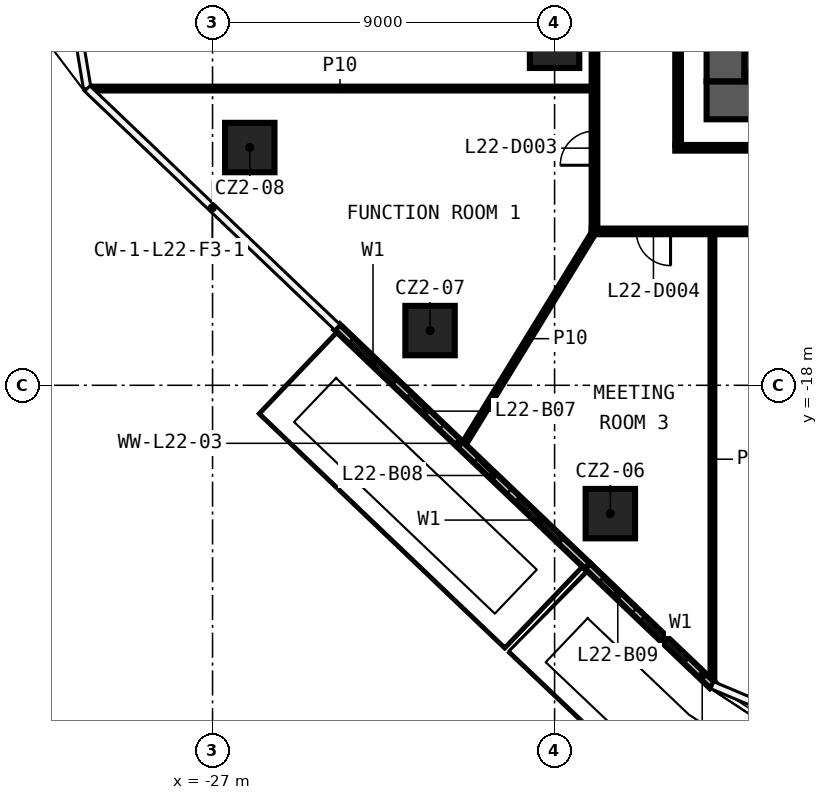
"""IFC4 building model, lengths in metres.
Left out: names, types, materials, properties, quantities, classifications, styles, units other than length and angle.
Written with IfcOpenShell. Run it as: python <this file> out.ifc"""

import sys

from ifc_helpers import new_model, si_unit, direction, frame, frame_2d, origin, origin_2d, place, context, subcontext, project, spatial, rectangle, extrude, element, fill, save


model = new_model("IFC4")
c1 = context("Model", 3, precision=1e-05, world=origin(), true_north=direction((0.0, 1.0)))
c2 = subcontext(c1, "Body", "Model", "MODEL_VIEW")
j1 = project(units=[si_unit("LENGTHUNIT", "METRE"), si_unit("PLANEANGLEUNIT", "RADIAN")], contexts=[c1])
p1 = place(None, origin())
s1 = spatial("IfcSite", under=j1, at=p1, CompositionType="ELEMENT")
p2 = place(p1, origin())
s2 = spatial("IfcBuilding", under=s1, at=p2, CompositionType="ELEMENT")
p3 = place(p2, frame((0.0, 0.0, 106.3)))
s3 = spatial("IfcBuildingStorey", under=s2, at=p3, CompositionType="ELEMENT", Elevation=106.3)
for number, where, z_axis, x_axis in (
    (1, (-16.533, -21.377, 0.0), (0.0, 0.0, 1.0), (1.0, 0.0, 0.0)),
    (2, (-21.277, -16.56, 0.0), (0.0, 0.0, 1.0), (1.0, 0.0, 0.0)),
    (3, (-26.021, -11.743, 0.0), (0.0, 0.0, 1.0), (1.0, 0.0, 0.0)),
    (4, (-18.0, -9.0, 0.0), (0.0, 0.0, 1.0), (1.0, 0.0, 0.0)),
):
    element("IfcColumn", number, at=place(p3, frame(where, z_axis=z_axis, x_axis=x_axis)), inside=s3, PredefinedType="COLUMN", context=c2, shape_type="SweptSolid", body=[
        extrude(rectangle(XDim=1.3, YDim=1.3, at=origin_2d()), origin(), (0.0, 0.0, 1.0), 3.3),
    ])
p4 = place(p3, frame((17.025, -13.95, 0.0), z_axis=(0.0, 0.0, 1.0), x_axis=(-1.0, 0.0, 0.0)))
e5 = element("IfcWall", 5, at=p4, inside=s3, PredefinedType="PARTITIONING", context=c2, shape_type="SweptSolid", body=[
    extrude(rectangle(XDim=34.05, YDim=0.15, at=frame_2d((17.025, 0.0))), origin(), (0.0, 0.0, 1.0), 3.3),
])
p5 = place(p4, frame((31.974, 0.0, 0.0)))
e6 = element("IfcOpeningElement", 6, at=p5, cuts=e5, PredefinedType="OPENING", context=c2, shape_type="SweptSolid", body=[
    extrude(rectangle(XDim=0.9, YDim=2.1, at=frame_2d((0.45, 1.05))), frame((0.0, 0.085, 0.0), z_axis=(0.0, -1.0, 0.0), x_axis=(1.0, 0.0, 0.0)), (0.0, 0.0, 1.0), 0.17),
])
p6 = place(p4, frame((27.543, 0.0, 0.0)))
e7 = element("IfcOpeningElement", 7, at=p6, cuts=e5, PredefinedType="OPENING", context=c2, shape_type="SweptSolid", body=[
    extrude(rectangle(XDim=1.0, YDim=2.1, at=frame_2d((0.5, 1.05))), frame((0.0, 0.085, 0.0), z_axis=(0.0, -1.0, 0.0), x_axis=(1.0, 0.0, 0.0)), (0.0, 0.0, 1.0), 0.17),
])
p7 = place(p4, frame((16.333, 0.0, 0.0)))
e8 = element("IfcOpeningElement", 8, at=p7, cuts=e5, PredefinedType="OPENING", context=c2, shape_type="SweptSolid", body=[
    extrude(rectangle(XDim=1.0, YDim=2.1, at=frame_2d((0.5, 1.05))), frame((0.0, 0.085, 0.0), z_axis=(0.0, -1.0, 0.0), x_axis=(1.0, 0.0, 0.0)), (0.0, 0.0, 1.0), 0.17),
])
p8 = place(p4, frame((12.006, 0.0, 0.0)))
e9 = element("IfcOpeningElement", 9, at=p8, cuts=e5, PredefinedType="OPENING", context=c2, shape_type="SweptSolid", body=[
    extrude(rectangle(XDim=1.0, YDim=2.1, at=frame_2d((0.5, 1.05))), frame((0.0, 0.085, 0.0), z_axis=(0.0, -1.0, 0.0), x_axis=(1.0, 0.0, 0.0)), (0.0, 0.0, 1.0), 0.17),
])
p9 = place(p4, frame((5.124, 0.0, 0.0)))
e10 = element("IfcOpeningElement", 10, at=p9, cuts=e5, PredefinedType="OPENING", context=c2, shape_type="SweptSolid", body=[
    extrude(rectangle(XDim=1.0, YDim=2.1, at=frame_2d((0.5, 1.05))), frame((0.0, 0.085, 0.0), z_axis=(0.0, -1.0, 0.0), x_axis=(1.0, 0.0, 0.0)), (0.0, 0.0, 1.0), 0.17),
])
p10 = place(p4, frame((3.144, 0.0, 0.0)))
e11 = element("IfcOpeningElement", 11, at=p10, cuts=e5, PredefinedType="OPENING", context=c2, shape_type="SweptSolid", body=[
    extrude(rectangle(XDim=1.0, YDim=2.1, at=frame_2d((0.5, 1.05))), frame((0.0, 0.085, 0.0), z_axis=(0.0, -1.0, 0.0), x_axis=(1.0, 0.0, 0.0)), (0.0, 0.0, 1.0), 0.17),
])
p11 = place(p3, frame((-14.825, -11.75, 0.0), z_axis=(0.0, 0.0, 1.0), x_axis=(1.0, 0.0, 0.0)))
e12 = element("IfcWall", 12, at=p11, inside=s3, PredefinedType="PARTITIONING", context=c2, shape_type="SweptSolid", body=[
    extrude(rectangle(XDim=22.025, YDim=0.15, at=frame_2d((11.012, 0.0))), origin(), (0.0, 0.0, 1.0), 3.3),
])
p12 = place(p3, frame((-30.268, -10.191, 0.0), z_axis=(0.0, 0.0, 1.0), x_axis=(1.0, 0.0, 0.0)))
e13 = element("IfcWall", 13, at=p12, inside=s3, PredefinedType="PARTITIONING", context=c2, shape_type="SweptSolid", body=[
    extrude(rectangle(XDim=13.243, YDim=0.1, at=frame_2d((6.622, 0.0))), origin(), (0.0, 0.0, 1.0), 3.3),
])
p13 = place(p3, frame((-20.415, -19.596, 0.0), z_axis=(0.0, 0.0, 1.0), x_axis=(0.5230874117, 0.85227903865, 0.0)))
e14 = element("IfcWall", 14, at=p13, inside=s3, PredefinedType="PARTITIONING", context=c2, shape_type="SweptSolid", body=[
    extrude(rectangle(XDim=6.624, YDim=0.1, at=frame_2d((3.312, 0.0))), origin(), (0.0, 0.0, 1.0), 3.3),
])
p14 = place(p3, frame((-13.847, -25.865, 0.0), z_axis=(0.0, 0.0, 1.0), x_axis=(0.0, 1.0, 0.0)))
e15 = element("IfcWall", 15, at=p14, inside=s3, PredefinedType="PARTITIONING", context=c2, shape_type="SweptSolid", body=[
    extrude(rectangle(XDim=11.84, YDim=0.1, at=frame_2d((5.92, 0.0))), origin(), (0.0, 0.0, 1.0), 3.3),
])
p15 = place(p3, frame((-14.75, 11.675, 0.0), z_axis=(0.0, 0.0, 1.0), x_axis=(0.0, -1.0, 0.0)))
e16 = element("IfcWall", 16, at=p15, inside=s3, PredefinedType="PARTITIONING", context=c2, shape_type="SweptSolid", body=[
    extrude(rectangle(XDim=23.35, YDim=0.15, at=frame_2d((11.675, 0.0))), origin(), (0.0, 0.0, 1.0), 3.3),
])
p16 = place(p15, frame((11.225, 0.0, 0.0)))
e17 = element("IfcOpeningElement", 17, at=p16, cuts=e16, PredefinedType="OPENING", context=c2, shape_type="SweptSolid", body=[
    extrude(rectangle(XDim=0.9, YDim=2.1, at=frame_2d((0.45, 1.05))), frame((0.0, 0.085, 0.0), z_axis=(0.0, -1.0, 0.0), x_axis=(1.0, 0.0, 0.0)), (0.0, 0.0, 1.0), 0.17),
])
p17 = place(p3, frame((-16.95, -13.875, 0.0), z_axis=(0.0, 0.0, 1.0), x_axis=(0.0, 1.0, 0.0)))
e18 = element("IfcWall", 18, at=p17, inside=s3, PredefinedType="PARTITIONING", context=c2, shape_type="SweptSolid", body=[
    extrude(rectangle(XDim=27.75, YDim=0.15, at=frame_2d((13.875, 0.0))), origin(), (0.0, 0.0, 1.0), 3.3),
])
p18 = place(p17, frame((11.06, 0.0, 0.0)))
e19 = element("IfcOpeningElement", 19, at=p18, cuts=e18, PredefinedType="OPENING", context=c2, shape_type="SweptSolid", body=[
    extrude(rectangle(XDim=0.9, YDim=2.1, at=frame_2d((0.45, 1.05))), frame((0.0, 0.085, 0.0), z_axis=(0.0, -1.0, 0.0), x_axis=(1.0, 0.0, 0.0)), (0.0, 0.0, 1.0), 0.17),
])
p19 = place(p17, frame((8.387, 0.0, 0.0)))
e20 = element("IfcOpeningElement", 20, at=p19, cuts=e18, PredefinedType="OPENING", context=c2, shape_type="SweptSolid", body=[
    extrude(rectangle(XDim=0.9, YDim=2.1, at=frame_2d((0.45, 1.05))), frame((0.0, 0.085, 0.0), z_axis=(0.0, -1.0, 0.0), x_axis=(1.0, 0.0, 0.0)), (0.0, 0.0, 1.0), 0.17),
])
p20 = place(p17, frame((1.666, 0.0, 0.0)))
e21 = element("IfcOpeningElement", 21, at=p20, cuts=e18, PredefinedType="OPENING", context=c2, shape_type="SweptSolid", body=[
    extrude(rectangle(XDim=0.9, YDim=2.1, at=frame_2d((0.45, 1.05))), frame((0.0, 0.085, 0.0), z_axis=(0.0, -1.0, 0.0), x_axis=(1.0, 0.0, 0.0)), (0.0, 0.0, 1.0), 0.17),
])
p21 = place(p17, frame((25.152, 0.0, 0.0)))
e22 = element("IfcOpeningElement", 22, at=p21, cuts=e18, PredefinedType="OPENING", context=c2, shape_type="SweptSolid", body=[
    extrude(rectangle(XDim=0.9, YDim=2.1, at=frame_2d((0.45, 1.05))), frame((0.0, 0.085, 0.0), z_axis=(0.0, -1.0, 0.0), x_axis=(1.0, 0.0, 0.0)), (0.0, 0.0, 1.0), 0.17),
])
p22 = place(p17, frame((18.782, 0.0, 0.0)))
e23 = element("IfcOpeningElement", 23, at=p22, cuts=e18, PredefinedType="OPENING", context=c2, shape_type="SweptSolid", body=[
    extrude(rectangle(XDim=1.0, YDim=2.1, at=frame_2d((0.5, 1.05))), frame((0.0, 0.085, 0.0), z_axis=(0.0, -1.0, 0.0), x_axis=(1.0, 0.0, 0.0)), (0.0, 0.0, 1.0), 0.17),
])
p23 = place(p17, frame((17.26, 0.0, 0.0)))
e24 = element("IfcOpeningElement", 24, at=p23, cuts=e18, PredefinedType="OPENING", context=c2, shape_type="SweptSolid", body=[
    extrude(rectangle(XDim=1.0, YDim=2.1, at=frame_2d((0.5, 1.05))), frame((0.0, 0.085, 0.0), z_axis=(0.0, -1.0, 0.0), x_axis=(1.0, 0.0, 0.0)), (0.0, 0.0, 1.0), 0.17),
])
p24 = place(p3, frame((-23.718, -16.471, 0.0), z_axis=(0.0, 0.0, 1.0), x_axis=(0.723342757747, -0.690489141706, 0.0)))
e25 = element("IfcWall", 25, at=p24, inside=s3, PredefinedType="SOLIDWALL", context=c2, shape_type="SweptSolid", body=[
    extrude(rectangle(XDim=9.103, YDim=0.2, at=frame_2d((4.552, 0.0))), origin(), (0.0, 0.0, 1.0), 3.3),
])
p25 = place(p24, frame((0.5, 0.0, 0.6)))
e26 = element("IfcOpeningElement", 26, at=p25, cuts=e25, PredefinedType="OPENING", context=c2, shape_type="SweptSolid", body=[
    extrude(rectangle(XDim=1.6, YDim=2.4, at=frame_2d((0.8, 1.2))), frame((0.0, 0.11, 0.0), z_axis=(0.0, -1.0, 0.0), x_axis=(1.0, 0.0, 0.0)), (0.0, 0.0, 1.0), 0.22),
])
p26 = place(p24, frame((2.6, 0.0, 0.0)))
e27 = element("IfcOpeningElement", 27, at=p26, cuts=e25, PredefinedType="OPENING", context=c2, shape_type="SweptSolid", body=[
    extrude(rectangle(XDim=1.2, YDim=2.4, at=frame_2d((0.6, 1.2))), frame((0.0, 0.11, 0.0), z_axis=(0.0, -1.0, 0.0), x_axis=(1.0, 0.0, 0.0)), (0.0, 0.0, 1.0), 0.22),
])
p27 = place(p24, frame((6.552, 0.0, 0.6)))
e28 = element("IfcOpeningElement", 28, at=p27, cuts=e25, PredefinedType="OPENING", context=c2, shape_type="SweptSolid", body=[
    extrude(rectangle(XDim=1.6, YDim=2.4, at=frame_2d((0.8, 1.2))), frame((0.0, 0.11, 0.0), z_axis=(0.0, -1.0, 0.0), x_axis=(1.0, 0.0, 0.0)), (0.0, 0.0, 1.0), 0.22),
])
p28 = place(p24, frame((5.052, 0.0, 0.0)))
e29 = element("IfcOpeningElement", 29, at=p28, cuts=e25, PredefinedType="OPENING", context=c2, shape_type="SweptSolid", body=[
    extrude(rectangle(XDim=1.2, YDim=2.4, at=frame_2d((0.6, 1.2))), frame((0.0, 0.11, 0.0), z_axis=(0.0, -1.0, 0.0), x_axis=(1.0, 0.0, 0.0)), (0.0, 0.0, 1.0), 0.22),
])
p29 = place(p3, frame((-17.133, -22.756, 0.0), z_axis=(0.0, 0.0, 1.0), x_axis=(0.723361644964, -0.69046935529, 0.0)))
e30 = element("IfcWall", 30, at=p29, inside=s3, PredefinedType="SOLIDWALL", context=c2, shape_type="SweptSolid", body=[
    extrude(rectangle(XDim=4.542, YDim=0.2, at=frame_2d((2.271, 0.0))), origin(), (0.0, 0.0, 1.0), 3.3),
])
p30 = place(p29, frame((2.0, 0.0, 0.6)))
e31 = element("IfcOpeningElement", 31, at=p30, cuts=e30, PredefinedType="OPENING", context=c2, shape_type="SweptSolid", body=[
    extrude(rectangle(XDim=1.6, YDim=2.4, at=frame_2d((0.8, 1.2))), frame((0.0, 0.11, 0.0), z_axis=(0.0, -1.0, 0.0), x_axis=(1.0, 0.0, 0.0)), (0.0, 0.0, 1.0), 0.22),
])
p31 = place(p29, frame((0.5, 0.0, 0.0)))
e32 = element("IfcOpeningElement", 32, at=p31, cuts=e30, PredefinedType="OPENING", context=c2, shape_type="SweptSolid", body=[
    extrude(rectangle(XDim=1.2, YDim=2.4, at=frame_2d((0.6, 1.2))), frame((0.0, 0.11, 0.0), z_axis=(0.0, -1.0, 0.0), x_axis=(1.0, 0.0, 0.0)), (0.0, 0.0, 1.0), 0.22),
])
p32 = place(p3, frame((14.0, -10.5, 0.0), z_axis=(0.0, 0.0, 1.0), x_axis=(-1.0, 0.0, 0.0)))
e33 = element("IfcWall", 33, at=p32, inside=s3, PredefinedType="SHEAR", context=c2, shape_type="SweptSolid", body=[
    extrude(rectangle(XDim=28.0, YDim=1.0, at=frame_2d((14.0, 0.0))), origin(), (0.0, 0.0, 1.0), 3.3),
])
p33 = place(p32, frame((5.1, 0.0, 0.0)))
e34 = element("IfcOpeningElement", 34, at=p33, cuts=e33, PredefinedType="OPENING", context=c2, shape_type="SweptSolid", body=[
    extrude(rectangle(XDim=1.6, YDim=2.1, at=frame_2d((0.8, 1.05))), frame((0.0, 0.51, 0.0), z_axis=(0.0, -1.0, 0.0), x_axis=(1.0, 0.0, 0.0)), (0.0, 0.0, 1.0), 1.02),
])
p34 = place(p3, frame((-13.5, -10.0, 0.0), z_axis=(0.0, 0.0, 1.0), x_axis=(0.0, 1.0, 0.0)))
e35 = element("IfcWall", 35, at=p34, inside=s3, PredefinedType="SHEAR", context=c2, shape_type="SweptSolid", body=[
    extrude(rectangle(XDim=20.0, YDim=1.0, at=frame_2d((10.0, 0.0))), origin(), (0.0, 0.0, 1.0), 3.3),
])
p35 = place(p3, frame((6.9, -9.9, 0.0), z_axis=(0.0, 0.0, 1.0), x_axis=(-1.0, 0.0, 0.0)))
e36 = element("IfcWall", 36, at=p35, inside=s3, PredefinedType="SHEAR", context=c2, shape_type="SweptSolid", body=[
    extrude(rectangle(XDim=19.9, YDim=0.2, at=frame_2d((9.95, 0.0))), origin(), (0.0, 0.0, 1.0), 3.3),
])
p36 = place(p3, frame((-12.9, -9.8, 0.0), z_axis=(0.0, 0.0, 1.0), x_axis=(0.0, 1.0, 0.0)))
e37 = element("IfcWall", 37, at=p36, inside=s3, PredefinedType="SHEAR", context=c2, shape_type="SweptSolid", body=[
    extrude(rectangle(XDim=19.6, YDim=0.2, at=frame_2d((9.8, 0.0))), origin(), (0.0, 0.0, 1.0), 3.3),
])
p37 = place(p20, origin())
e38 = element("IfcDoor", 38, at=p37, inside=s3, OperationType="SINGLE_SWING_LEFT", PredefinedType="DOOR", context=c2, shape_type="SweptSolid", body=[
    extrude(rectangle(XDim=0.9, YDim=2.1, at=frame_2d((0.45, 1.05))), frame((0.0, 0.025, 0.0), z_axis=(0.0, -1.0, 0.0), x_axis=(1.0, 0.0, 0.0)), (0.0, 0.0, 1.0), 0.05),
])
fill(e21, e38)
p38 = place(p5, origin())
e39 = element("IfcDoor", 39, at=p38, inside=s3, OperationType="SINGLE_SWING_RIGHT", PredefinedType="DOOR", context=c2, shape_type="SweptSolid", body=[
    extrude(rectangle(XDim=0.9, YDim=2.1, at=frame_2d((0.45, 1.05))), frame((0.0, 0.025, 0.0), z_axis=(0.0, -1.0, 0.0), x_axis=(1.0, 0.0, 0.0)), (0.0, 0.0, 1.0), 0.05),
])
fill(e6, e39)
p39 = place(p25, origin())
e40 = element("IfcWindow", 40, at=p39, inside=s3, PartitioningType="SINGLE_PANEL", PredefinedType="WINDOW", context=c2, shape_type="SweptSolid", body=[
    extrude(rectangle(XDim=1.6, YDim=2.4, at=frame_2d((0.8, 1.2))), frame((0.0, 0.03, 0.0), z_axis=(0.0, -1.0, 0.0), x_axis=(1.0, 0.0, 0.0)), (0.0, 0.0, 1.0), 0.06),
])
fill(e26, e40)
p40 = place(p26, origin())
e41 = element("IfcDoor", 41, at=p40, inside=s3, OperationType="SLIDING_TO_LEFT", PredefinedType="DOOR", context=c2, shape_type="SweptSolid", body=[
    extrude(rectangle(XDim=1.2, YDim=2.4, at=frame_2d((0.6, 1.2))), frame((0.0, 0.025, 0.0), z_axis=(0.0, -1.0, 0.0), x_axis=(1.0, 0.0, 0.0)), (0.0, 0.0, 1.0), 0.05),
])
fill(e27, e41)
p41 = place(p27, origin())
e42 = element("IfcWindow", 42, at=p41, inside=s3, PartitioningType="SINGLE_PANEL", PredefinedType="WINDOW", context=c2, shape_type="SweptSolid", body=[
    extrude(rectangle(XDim=1.6, YDim=2.4, at=frame_2d((0.8, 1.2))), frame((0.0, 0.03, 0.0), z_axis=(0.0, -1.0, 0.0), x_axis=(1.0, 0.0, 0.0)), (0.0, 0.0, 1.0), 0.06),
])
fill(e28, e42)
p42 = place(p28, origin())
e43 = element("IfcDoor", 43, at=p42, inside=s3, OperationType="SLIDING_TO_LEFT", PredefinedType="DOOR", context=c2, shape_type="SweptSolid", body=[
    extrude(rectangle(XDim=1.2, YDim=2.4, at=frame_2d((0.6, 1.2))), frame((0.0, 0.025, 0.0), z_axis=(0.0, -1.0, 0.0), x_axis=(1.0, 0.0, 0.0)), (0.0, 0.0, 1.0), 0.05),
])
fill(e29, e43)
p43 = place(p30, origin())
e44 = element("IfcWindow", 44, at=p43, inside=s3, PartitioningType="SINGLE_PANEL", PredefinedType="WINDOW", context=c2, shape_type="SweptSolid", body=[
    extrude(rectangle(XDim=1.6, YDim=2.4, at=frame_2d((0.8, 1.2))), frame((0.0, 0.03, 0.0), z_axis=(0.0, -1.0, 0.0), x_axis=(1.0, 0.0, 0.0)), (0.0, 0.0, 1.0), 0.06),
])
fill(e31, e44)
p44 = place(p31, origin())
e45 = element("IfcDoor", 45, at=p44, inside=s3, OperationType="SLIDING_TO_LEFT", PredefinedType="DOOR", context=c2, shape_type="SweptSolid", body=[
    extrude(rectangle(XDim=1.2, YDim=2.4, at=frame_2d((0.6, 1.2))), frame((0.0, 0.025, 0.0), z_axis=(0.0, -1.0, 0.0), x_axis=(1.0, 0.0, 0.0)), (0.0, 0.0, 1.0), 0.05),
])
fill(e32, e45)
save(model, sys.argv[1])
